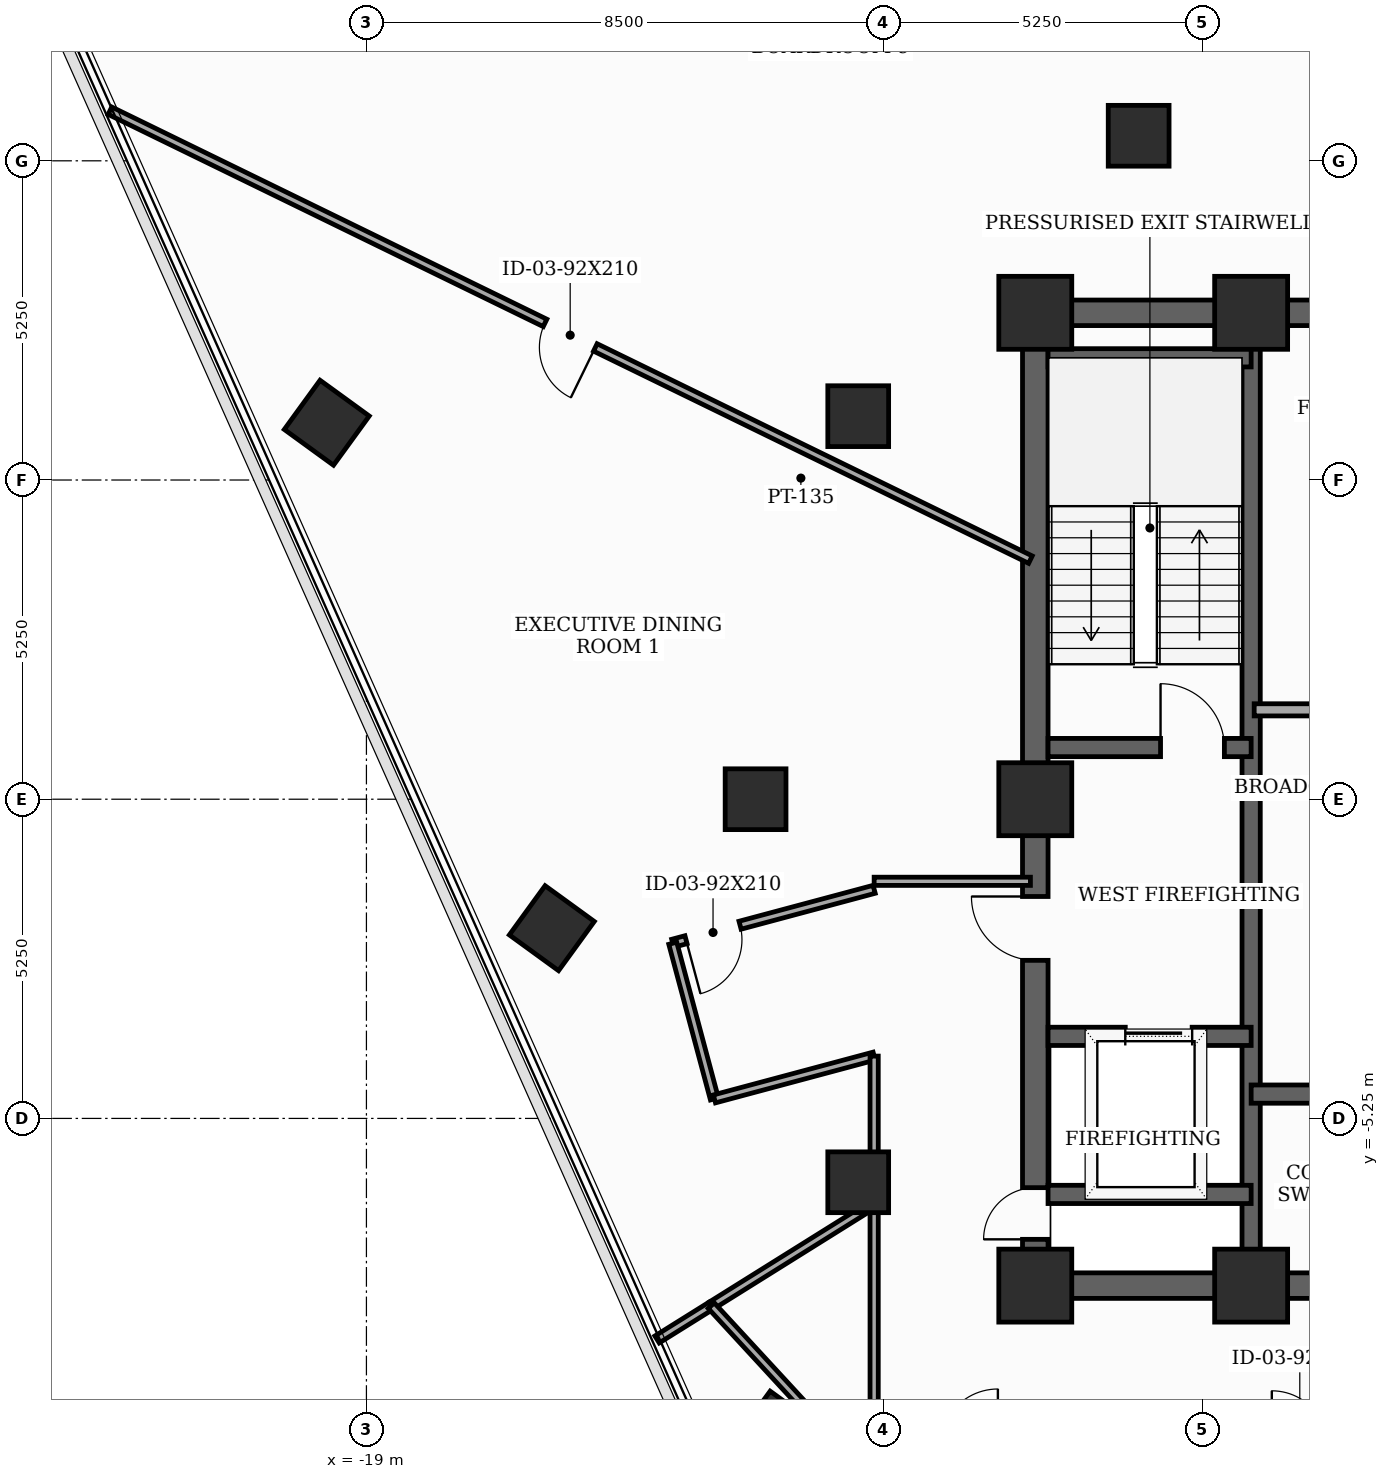
"""IFC4 building model, lengths in metres.
Left out: names, types, materials, properties, quantities, classifications, styles, units other than length and angle.
Written with IfcOpenShell. Run it as: python <this file> out.ifc"""

import sys

from ifc_helpers import new_model, si_unit, direction, frame, frame_2d, origin, origin_2d, place, context, subcontext, project, spatial, rectangle, extrude, element, fill, save


model = new_model("IFC4")
c1 = context("Model", 3, precision=1e-05, world=origin(), true_north=direction((0.0, 1.0)))
c2 = subcontext(c1, "Body", "Model", "MODEL_VIEW")
j1 = project(units=[si_unit("LENGTHUNIT", "METRE"), si_unit("PLANEANGLEUNIT", "RADIAN")], contexts=[c1])
p1 = place(None, origin())
s1 = spatial("IfcSite", under=j1, at=p1, CompositionType="ELEMENT")
p2 = place(p1, origin())
s2 = spatial("IfcBuilding", under=s1, at=p2, CompositionType="ELEMENT")
p3 = place(p2, frame((0.0, 0.0, 222.6)))
s3 = spatial("IfcBuildingStorey", under=s2, at=p3, CompositionType="ELEMENT", Elevation=222.6)
for number, where, z_axis, x_axis in (
    (1, (-8.0, -8.0, 0.0), (0.0, 0.0, 1.0), (1.0, 0.0, 0.0)),
    (2, (-4.45, -8.0, 0.0), (0.0, 0.0, 1.0), (1.0, 0.0, 0.0)),
    (3, (-4.45, 8.0, 0.0), (0.0, 0.0, 1.0), (1.0, 0.0, 0.0)),
    (4, (-8.0, 8.0, 0.0), (0.0, 0.0, 1.0), (1.0, 0.0, 0.0)),
    (5, (-8.0, 0.0, 0.0), (0.0, 0.0, 1.0), (1.0, 0.0, 0.0)),
):
    element("IfcColumn", number, at=place(p3, frame(where, z_axis=z_axis, x_axis=x_axis)), inside=s3, PredefinedType="COLUMN", context=c2, shape_type="SweptSolid", body=[
        extrude(rectangle(XDim=1.2, YDim=1.2, at=origin_2d()), origin(), (0.0, 0.0, 1.0), 3.7),
    ])
for number, where, z_axis, x_axis in (
    (6, (-6.3, 10.912, 0.0), (0.0, 0.0, 1.0), (1.0, 0.0, 0.0)),
    (7, (-10.912, 6.3, 0.0), (0.0, 0.0, 1.0), (1.0, 0.0, 0.0)),
    (8, (-12.6, 0.0, 0.0), (0.0, 0.0, 1.0), (1.0, 0.0, 0.0)),
    (9, (-10.912, -6.3, 0.0), (0.0, 0.0, 1.0), (1.0, 0.0, 0.0)),
    (10, (-19.652, 6.192, 0.0), (0.0, 0.0, 1.0), (0.588, 0.809, 0.0)),
    (11, (-15.951, -2.121, 0.0), (0.0, 0.0, 1.0), (0.588, 0.809, 0.0)),
    (12, (-12.25, -10.435, 0.0), (0.0, 0.0, 1.0), (0.588, 0.809, 0.0)),
):
    element("IfcColumn", number, at=place(p3, frame(where, z_axis=z_axis, x_axis=x_axis)), inside=s3, PredefinedType="COLUMN", context=c2, shape_type="SweptSolid", body=[
        extrude(rectangle(XDim=1.0, YDim=1.0, at=origin_2d()), origin(), (0.0, 0.0, 1.0), 3.7),
    ])
p4 = place(p3, frame((-8.0, -8.0, 0.0), z_axis=(0.0, 0.0, 1.0), x_axis=(0.0, 1.0, 0.0)))
e13 = element("IfcWall", 13, at=p4, inside=s3, PredefinedType="SHEAR", context=c2, shape_type="SweptSolid", body=[
    extrude(rectangle(XDim=16.0, YDim=0.42, at=frame_2d((8.0, 0.0))), origin(), (0.0, 0.0, 1.0), 3.5),
])
p5 = place(p4, frame((0.761, 0.0, 0.0)))
e14 = element("IfcOpeningElement", 14, at=p5, cuts=e13, PredefinedType="OPENING", context=c2, shape_type="SweptSolid", body=[
    extrude(rectangle(XDim=0.85, YDim=2.02, at=frame_2d((0.425, 1.01))), frame((0.0, 0.22, 0.0), z_axis=(0.0, -1.0, 0.0), x_axis=(1.0, 0.0, 0.0)), (0.0, 0.0, 1.0), 0.44),
])
p6 = place(p4, frame((5.35, 0.0, 0.0)))
e15 = element("IfcOpeningElement", 15, at=p6, cuts=e13, PredefinedType="OPENING", context=c2, shape_type="SweptSolid", body=[
    extrude(rectangle(XDim=1.05, YDim=2.15, at=frame_2d((0.525, 1.075))), frame((0.0, 0.22, 0.0), z_axis=(0.0, -1.0, 0.0), x_axis=(1.0, 0.0, 0.0)), (0.0, 0.0, 1.0), 0.44),
])
p7 = place(p3, frame((-8.0, -8.0, 0.0), z_axis=(0.0, 0.0, 1.0), x_axis=(1.0, 0.0, 0.0)))
e16 = element("IfcWall", 16, at=p7, inside=s3, PredefinedType="SHEAR", context=c2, shape_type="SweptSolid", body=[
    extrude(rectangle(XDim=16.0, YDim=0.42, at=frame_2d((8.0, 0.0))), origin(), (0.0, 0.0, 1.0), 3.5),
])
p8 = place(p7, frame((7.52, 0.0, 0.0)))
e17 = element("IfcOpeningElement", 17, at=p8, cuts=e16, PredefinedType="OPENING", context=c2, shape_type="SweptSolid", body=[
    extrude(rectangle(XDim=0.95, YDim=2.1, at=frame_2d((0.475, 1.05))), frame((0.0, 0.22, 0.0), z_axis=(0.0, -1.0, 0.0), x_axis=(1.0, 0.0, 0.0)), (0.0, 0.0, 1.0), 0.44),
])
p9 = place(p3, frame((-8.0, 8.0, 0.0), z_axis=(0.0, 0.0, 1.0), x_axis=(1.0, 0.0, 0.0)))
e18 = element("IfcWall", 18, at=p9, inside=s3, PredefinedType="SHEAR", context=c2, shape_type="SweptSolid", body=[
    extrude(rectangle(XDim=16.0, YDim=0.42, at=frame_2d((8.0, 0.0))), origin(), (0.0, 0.0, 1.0), 3.5),
])
p10 = place(p9, frame((7.1, 0.0, 0.0)))
e19 = element("IfcOpeningElement", 19, at=p10, cuts=e18, PredefinedType="OPENING", context=c2, shape_type="SweptSolid", body=[
    extrude(rectangle(XDim=1.8, YDim=2.15, at=frame_2d((0.9, 1.075))), frame((0.0, 0.22, 0.0), z_axis=(0.0, -1.0, 0.0), x_axis=(1.0, 0.0, 0.0)), (0.0, 0.0, 1.0), 0.44),
])
p11 = place(p3, frame((-4.45, -7.79, 0.0), z_axis=(0.0, 0.0, 1.0), x_axis=(0.0, 1.0, 0.0)))
e20 = element("IfcWall", 20, at=p11, inside=s3, PredefinedType="SHEAR", context=c2, shape_type="SweptSolid", body=[
    extrude(rectangle(XDim=15.58, YDim=0.3, at=frame_2d((7.79, 0.0))), origin(), (0.0, 0.0, 1.0), 3.5),
])
p12 = place(p3, frame((-7.79, 0.85, 0.0), z_axis=(0.0, 0.0, 1.0), x_axis=(1.0, 0.0, 0.0)))
e21 = element("IfcWall", 21, at=p12, inside=s3, PredefinedType="SHEAR", context=c2, shape_type="SweptSolid", body=[
    extrude(rectangle(XDim=3.34, YDim=0.3, at=frame_2d((1.67, 0.0))), origin(), (0.0, 0.0, 1.0), 3.5),
])
p13 = place(p12, frame((1.85, 0.0, 0.0)))
e22 = element("IfcOpeningElement", 22, at=p13, cuts=e21, PredefinedType="OPENING", context=c2, shape_type="SweptSolid", body=[
    extrude(rectangle(XDim=1.05, YDim=2.15, at=frame_2d((0.525, 1.075))), frame((0.0, 0.16, 0.0), z_axis=(0.0, -1.0, 0.0), x_axis=(1.0, 0.0, 0.0)), (0.0, 0.0, 1.0), 0.32),
])
p14 = place(p3, frame((-7.79, 7.26, 0.0), z_axis=(0.0, 0.0, 1.0), x_axis=(1.0, 0.0, 0.0)))
e23 = element("IfcWall", 23, at=p14, inside=s3, PredefinedType="SHEAR", context=c2, shape_type="SweptSolid", body=[
    extrude(rectangle(XDim=3.34, YDim=0.3, at=frame_2d((1.67, 0.0))), origin(), (0.0, 0.0, 1.0), 3.5),
])
p15 = place(p3, frame((-7.79, -3.9, 0.0), z_axis=(0.0, 0.0, 1.0), x_axis=(1.0, 0.0, 0.0)))
e24 = element("IfcWall", 24, at=p15, inside=s3, PredefinedType="SHEAR", context=c2, shape_type="SweptSolid", body=[
    extrude(rectangle(XDim=3.34, YDim=0.3, at=frame_2d((1.67, 0.0))), origin(), (0.0, 0.0, 1.0), 3.5),
])
p16 = place(p15, frame((1.27, 0.0, 0.0)))
e25 = element("IfcOpeningElement", 25, at=p16, cuts=e24, PredefinedType="OPENING", context=c2, shape_type="SweptSolid", body=[
    extrude(rectangle(XDim=1.1, YDim=2.1, at=frame_2d((0.55, 1.05))), frame((0.0, 0.16, 0.0), z_axis=(0.0, -1.0, 0.0), x_axis=(1.0, 0.0, 0.0)), (0.0, 0.0, 1.0), 0.32),
])
p17 = place(p3, frame((-7.79, -6.5, 0.0), z_axis=(0.0, 0.0, 1.0), x_axis=(1.0, 0.0, 0.0)))
e26 = element("IfcWall", 26, at=p17, inside=s3, PredefinedType="SHEAR", context=c2, shape_type="SweptSolid", body=[
    extrude(rectangle(XDim=3.34, YDim=0.3, at=frame_2d((1.67, 0.0))), origin(), (0.0, 0.0, 1.0), 3.5),
])
p18 = place(p3, frame((-4.45, -4.85, 0.0), z_axis=(0.0, 0.0, 1.0), x_axis=(1.0, 0.0, 0.0)))
e27 = element("IfcWall", 27, at=p18, inside=s3, PredefinedType="SHEAR", context=c2, shape_type="SweptSolid", body=[
    extrude(rectangle(XDim=8.9, YDim=0.3, at=frame_2d((4.45, 0.0))), origin(), (0.0, 0.0, 1.0), 3.5),
])
p19 = place(p3, frame((-4.4, 1.47, 0.0), z_axis=(0.0, 0.0, 1.0), x_axis=(1.0, 0.0, 0.0)))
e28 = element("IfcWall", 28, at=p19, inside=s3, PredefinedType="SOLIDWALL", context=c2, shape_type="SweptSolid", body=[
    extrude(rectangle(XDim=2.68, YDim=0.2, at=frame_2d((1.34, 0.0))), origin(), (0.0, 0.0, 1.0), 3.5),
])
p20 = place(p3, frame((-8.08, -1.35, 0.0), z_axis=(0.0, 0.0, 1.0), x_axis=(-1.0, 0.0, 0.0)))
e29 = element("IfcWall", 29, at=p20, inside=s3, PredefinedType="PARTITIONING", context=c2, shape_type="SweptSolid", body=[
    extrude(rectangle(XDim=2.57, YDim=0.135, at=frame_2d((1.285, 0.0))), origin(), (0.0, 0.0, 1.0), 2.885),
])
p21 = place(p3, frame((-10.65, -1.482, 0.0), z_axis=(0.0, 0.0, 1.0), x_axis=(-0.965961397105, -0.2586862565, 0.0)))
e30 = element("IfcWall", 30, at=p21, inside=s3, PredefinedType="PARTITIONING", context=c2, shape_type="SweptSolid", body=[
    extrude(rectangle(XDim=3.429, YDim=0.135, at=frame_2d((1.714, 0.0))), origin(), (0.0, 0.0, 1.0), 2.885),
])
p22 = place(p21, frame((2.283, 0.0, 0.0)))
e31 = element("IfcOpeningElement", 31, at=p22, cuts=e30, PredefinedType="OPENING", context=c2, shape_type="SweptSolid", body=[
    extrude(rectangle(XDim=0.92, YDim=2.1, at=frame_2d((0.46, 1.05))), frame((0.0, 0.077, 0.0), z_axis=(0.0, -1.0, 0.0), x_axis=(1.0, 0.0, 0.0)), (0.0, 0.0, 1.0), 0.155),
])
p23 = place(p3, frame((-13.962, -2.369, 0.0), z_axis=(0.0, 0.0, 1.0), x_axis=(0.258413725385, -0.966034340245, 0.0)))
e32 = element("IfcWall", 32, at=p23, inside=s3, PredefinedType="PARTITIONING", context=c2, shape_type="SweptSolid", body=[
    extrude(rectangle(XDim=2.65, YDim=0.135, at=frame_2d((1.325, 0.0))), origin(), (0.0, 0.0, 1.0), 3.5),
])
p24 = place(p3, frame((-13.277, -4.929, 0.0), z_axis=(0.0, 0.0, 1.0), x_axis=(0.965934830229, 0.258785439601, 0.0)))
e33 = element("IfcWall", 33, at=p24, inside=s3, PredefinedType="PARTITIONING", context=c2, shape_type="SweptSolid", body=[
    extrude(rectangle(XDim=2.72, YDim=0.135, at=frame_2d((1.36, 0.0))), origin(), (0.0, 0.0, 1.0), 2.885),
])
p25 = place(p3, frame((-10.65, -4.225, 0.0), z_axis=(0.0, 0.0, 1.0), x_axis=(0.0, -1.0, 0.0)))
e34 = element("IfcWall", 34, at=p25, inside=s3, PredefinedType="PARTITIONING", context=c2, shape_type="SweptSolid", body=[
    extrude(rectangle(XDim=2.43, YDim=0.135, at=frame_2d((1.215, 0.0))), origin(), (0.0, 0.0, 1.0), 2.885),
])
p26 = place(p3, frame((-10.65, -6.655, 0.0), z_axis=(0.0, 0.0, 1.0), x_axis=(0.0, -1.0, 0.0)))
e35 = element("IfcWall", 35, at=p26, inside=s3, PredefinedType="PARTITIONING", context=c2, shape_type="SweptSolid", body=[
    extrude(rectangle(XDim=3.495, YDim=0.135, at=frame_2d((1.748, 0.0))), origin(), (0.0, 0.0, 1.0), 2.885),
])
p27 = place(p3, frame((-13.329, -8.329, 0.0), z_axis=(0.0, 0.0, 1.0), x_axis=(0.848059079617, 0.529901686617, 0.0)))
e36 = element("IfcWall", 36, at=p27, inside=s3, PredefinedType="PARTITIONING", context=c2, shape_type="SweptSolid", body=[
    extrude(rectangle(XDim=3.159, YDim=0.135, at=frame_2d((1.58, 0.0))), origin(), (0.0, 0.0, 1.0), 2.885),
])
p28 = place(p3, frame((-14.22, -8.885, 0.0), z_axis=(0.0, 0.0, 1.0), x_axis=(0.848337621773, 0.529455644493, 0.0)))
e37 = element("IfcWall", 37, at=p28, inside=s3, PredefinedType="PARTITIONING", context=c2, shape_type="SweptSolid", body=[
    extrude(rectangle(XDim=1.051, YDim=0.135, at=frame_2d((0.525, 0.0))), origin(), (0.0, 0.0, 1.0), 3.025),
])
p29 = place(p3, frame((-8.08, 3.941, 0.0), z_axis=(0.0, 0.0, 1.0), x_axis=(-0.898787530524, 0.438384505856, 0.0)))
e38 = element("IfcWall", 38, at=p29, inside=s3, PredefinedType="PARTITIONING", context=c2, shape_type="SweptSolid", body=[
    extrude(rectangle(XDim=16.843, YDim=0.135, at=frame_2d((8.421, 0.0))), origin(), (0.0, 0.0, 1.0), 2.885),
])
p30 = place(p29, frame((7.961, 0.0, 0.0)))
e39 = element("IfcOpeningElement", 39, at=p30, cuts=e38, PredefinedType="OPENING", context=c2, shape_type="SweptSolid", body=[
    extrude(rectangle(XDim=0.92, YDim=2.1, at=frame_2d((0.46, 1.05))), frame((0.0, 0.077, 0.0), z_axis=(0.0, -1.0, 0.0), x_axis=(1.0, 0.0, 0.0)), (0.0, 0.0, 1.0), 0.155),
])
p31 = place(p3, frame((-13.329, -8.329, 0.0), z_axis=(0.0, 0.0, 1.0), x_axis=(0.677841155448, -0.735208384052, 0.0)))
e40 = element("IfcWall", 40, at=p31, inside=s3, PredefinedType="PARTITIONING", context=c2, shape_type="SweptSolid", body=[
    extrude(rectangle(XDim=6.239, YDim=0.135, at=frame_2d((3.12, 0.0))), origin(), (0.0, 0.0, 1.0), 2.075),
])
p32 = place(p3, frame((-3.803, 15.255, 0.0), z_axis=(0.0, 0.0, 1.0), x_axis=(0.241851911951, -0.970313172479, 0.0)))
e41 = element("IfcWall", 41, at=p32, inside=s3, PredefinedType="PARTITIONING", context=c2, shape_type="SweptSolid", body=[
    extrude(rectangle(XDim=7.394, YDim=0.16, at=frame_2d((3.697, 0.0))), origin(), (0.0, 0.0, 1.0), 2.885),
])
p33 = place(p5, origin())
e42 = element("IfcDoor", 42, at=p33, inside=s3, OperationType="SINGLE_SWING_LEFT", PredefinedType="TRAPDOOR", context=c2, shape_type="SweptSolid", body=[
    extrude(rectangle(XDim=0.85, YDim=2.02, at=frame_2d((0.425, 1.01))), frame((0.0, 0.025, 0.0), z_axis=(0.0, -1.0, 0.0), x_axis=(1.0, 0.0, 0.0)), (0.0, 0.0, 1.0), 0.05),
])
fill(e14, e42)
p34 = place(p6, origin())
e43 = element("IfcDoor", 43, at=p34, inside=s3, OperationType="SINGLE_SWING_RIGHT", PredefinedType="DOOR", context=c2, shape_type="SweptSolid", body=[
    extrude(rectangle(XDim=1.05, YDim=2.15, at=frame_2d((0.525, 1.075))), frame((0.0, 0.025, 0.0), z_axis=(0.0, -1.0, 0.0), x_axis=(1.0, 0.0, 0.0)), (0.0, 0.0, 1.0), 0.05),
])
fill(e15, e43)
p35 = place(p13, origin())
e44 = element("IfcDoor", 44, at=p35, inside=s3, OperationType="SINGLE_SWING_LEFT", PredefinedType="DOOR", context=c2, shape_type="SweptSolid", body=[
    extrude(rectangle(XDim=1.05, YDim=2.15, at=frame_2d((0.525, 1.075))), frame((0.0, 0.025, 0.0), z_axis=(0.0, -1.0, 0.0), x_axis=(1.0, 0.0, 0.0)), (0.0, 0.0, 1.0), 0.05),
])
fill(e22, e44)
p36 = place(p16, origin())
e45 = element("IfcDoor", 45, at=p36, inside=s3, OperationType="SLIDING_TO_LEFT", PredefinedType="DOOR", context=c2, shape_type="SweptSolid", body=[
    extrude(rectangle(XDim=1.1, YDim=2.1, at=frame_2d((0.55, 1.05))), frame((0.0, 0.025, 0.0), z_axis=(0.0, -1.0, 0.0), x_axis=(1.0, 0.0, 0.0)), (0.0, 0.0, 1.0), 0.05),
])
fill(e25, e45)
p37 = place(p22, origin())
e46 = element("IfcDoor", 46, at=p37, inside=s3, OperationType="SINGLE_SWING_RIGHT", PredefinedType="DOOR", context=c2, shape_type="SweptSolid", body=[
    extrude(rectangle(XDim=0.92, YDim=2.1, at=frame_2d((0.46, 1.05))), frame((0.0, 0.025, 0.0), z_axis=(0.0, -1.0, 0.0), x_axis=(1.0, 0.0, 0.0)), (0.0, 0.0, 1.0), 0.05),
])
fill(e31, e46)
p38 = place(p30, origin())
e47 = element("IfcDoor", 47, at=p38, inside=s3, OperationType="SINGLE_SWING_LEFT", PredefinedType="DOOR", context=c2, shape_type="SweptSolid", body=[
    extrude(rectangle(XDim=0.92, YDim=2.1, at=frame_2d((0.46, 1.05))), frame((0.0, 0.025, 0.0), z_axis=(0.0, -1.0, 0.0), x_axis=(1.0, 0.0, 0.0)), (0.0, 0.0, 1.0), 0.05),
])
fill(e39, e47)
save(model, sys.argv[1])
